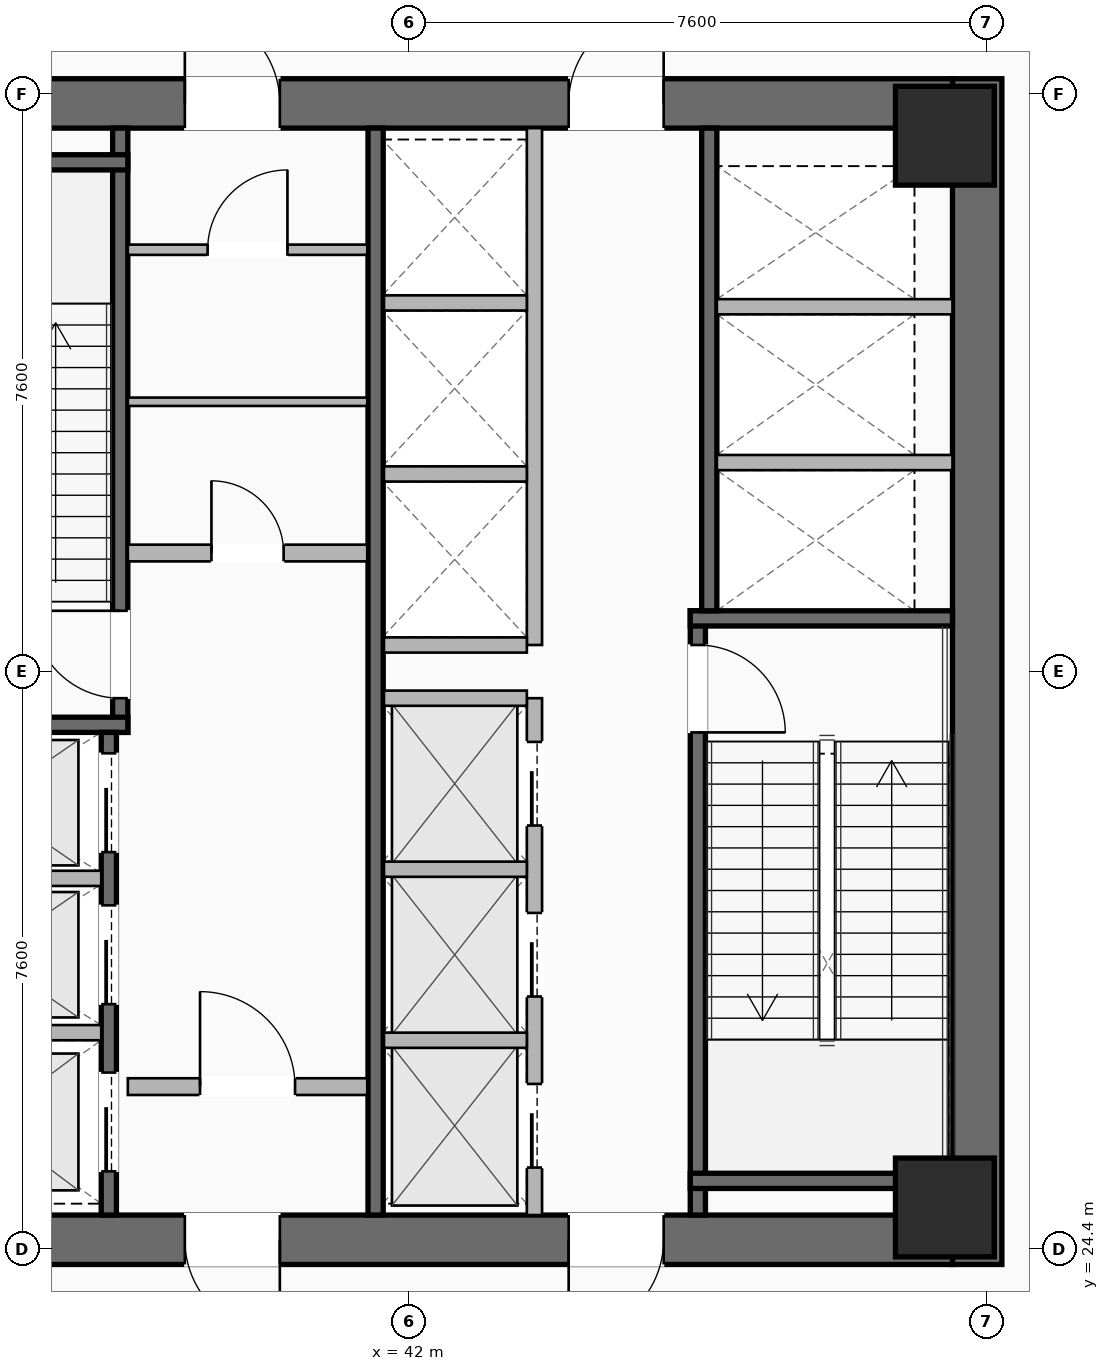
"""IFC4 building model, lengths in metres.
Left out: names, types, materials, properties, quantities, classifications, styles, units other than length and angle.
Written with IfcOpenShell. Run it as: python <this file> out.ifc"""

import sys

from ifc_helpers import new_model, si_unit, direction, frame, frame_2d, origin, origin_2d, place, context, subcontext, project, spatial, rectangle, hollow_rectangle, extrude, element, fill, save


model = new_model("IFC4")
c1 = context("Model", 3, precision=1e-05, world=origin(), true_north=direction((0.0, 1.0)))
c2 = subcontext(c1, "Body", "Model", "MODEL_VIEW")
j1 = project(units=[si_unit("LENGTHUNIT", "METRE"), si_unit("PLANEANGLEUNIT", "RADIAN")], contexts=[c1])
p1 = place(None, origin())
s1 = spatial("IfcSite", under=j1, at=p1, CompositionType="ELEMENT")
p2 = place(p1, origin())
s2 = spatial("IfcBuilding", under=s1, at=p2, CompositionType="ELEMENT")
p3 = place(p2, frame((0.0, 0.0, 10.2)))
s3 = spatial("IfcBuildingStorey", under=s2, at=p3, CompositionType="ELEMENT", Elevation=10.2)
p4 = place(p3, frame((49.475, 39.8, 0.0), z_axis=(0.0, 0.0, 1.0), x_axis=(0.0, -1.0, 0.0)))
e1 = element("IfcWall", 1, at=p4, inside=s3, PredefinedType="SHEAR", context=c2, shape_type="SweptSolid", body=[
    extrude(rectangle(XDim=15.6, YDim=0.65, at=frame_2d((7.8, 0.0))), origin(), (0.0, 0.0, 1.0), 5.4),
])
p5 = place(p3, frame((49.15, 24.525, 0.0), z_axis=(0.0, 0.0, 1.0), x_axis=(-1.0, 0.0, 0.0)))
e2 = element("IfcWall", 2, at=p5, inside=s3, PredefinedType="SHEAR", context=c2, shape_type="SweptSolid", body=[
    extrude(rectangle(XDim=14.3, YDim=0.65, at=frame_2d((7.15, 0.0))), origin(), (0.0, 0.0, 1.0), 5.4),
])
p6 = place(p5, frame((8.85, 0.0, 0.0)))
e3 = element("IfcOpeningElement", 3, at=p6, cuts=e2, PredefinedType="OPENING", context=c2, shape_type="SweptSolid", body=[
    extrude(rectangle(XDim=1.25, YDim=2.25, at=frame_2d((0.625, 1.125))), frame((0.0, 0.335, 0.0), z_axis=(0.0, -1.0, 0.0), x_axis=(1.0, 0.0, 0.0)), (0.0, 0.0, 1.0), 0.67),
])
p7 = place(p5, frame((3.8, 0.0, 0.0)))
e4 = element("IfcOpeningElement", 4, at=p7, cuts=e2, PredefinedType="OPENING", context=c2, shape_type="SweptSolid", body=[
    extrude(rectangle(XDim=1.25, YDim=2.25, at=frame_2d((0.625, 1.125))), frame((0.0, 0.335, 0.0), z_axis=(0.0, -1.0, 0.0), x_axis=(1.0, 0.0, 0.0)), (0.0, 0.0, 1.0), 0.67),
])
p8 = place(p3, frame((34.85, 39.475, 0.0), z_axis=(0.0, 0.0, 1.0), x_axis=(1.0, 0.0, 0.0)))
e5 = element("IfcWall", 5, at=p8, inside=s3, PredefinedType="SHEAR", context=c2, shape_type="SweptSolid", body=[
    extrude(rectangle(XDim=14.3, YDim=0.65, at=frame_2d((7.15, 0.0))), origin(), (0.0, 0.0, 1.0), 5.4),
])
p9 = place(p8, frame((4.2, 0.0, 0.0)))
e6 = element("IfcOpeningElement", 6, at=p9, cuts=e5, PredefinedType="OPENING", context=c2, shape_type="SweptSolid", body=[
    extrude(rectangle(XDim=1.25, YDim=2.25, at=frame_2d((0.625, 1.125))), frame((0.0, 0.335, 0.0), z_axis=(0.0, -1.0, 0.0), x_axis=(1.0, 0.0, 0.0)), (0.0, 0.0, 1.0), 0.67),
])
p10 = place(p8, frame((9.25, 0.0, 0.0)))
e7 = element("IfcOpeningElement", 7, at=p10, cuts=e5, PredefinedType="OPENING", context=c2, shape_type="SweptSolid", body=[
    extrude(rectangle(XDim=1.25, YDim=2.25, at=frame_2d((0.625, 1.125))), frame((0.0, 0.335, 0.0), z_axis=(0.0, -1.0, 0.0), x_axis=(1.0, 0.0, 0.0)), (0.0, 0.0, 1.0), 0.67),
])
for number, where, z_axis, x_axis in (
    (8, (49.05, 24.95, 0.0), (0.0, 0.0, 1.0), (1.0, 0.0, 0.0)),
    (9, (49.05, 39.05, 0.0), (0.0, 0.0, 1.0), (1.0, 0.0, 0.0)),
):
    element("IfcColumn", number, at=place(p3, frame(where, z_axis=z_axis, x_axis=x_axis)), inside=s3, PredefinedType="COLUMN", context=c2, shape_type="SweptSolid", body=[
        extrude(hollow_rectangle(XDim=1.3, YDim=1.3, WallThickness=0.05, at=origin_2d()), origin(), (0.0, 0.0, 1.0), 5.14),
    ])
p11 = place(p3, frame((38.2, 31.2, 0.0), z_axis=(0.0, 0.0, 1.0), x_axis=(0.0, 1.0, 0.0)))
e10 = element("IfcWall", 10, at=p11, inside=s3, PredefinedType="SHEAR", context=c2, shape_type="SweptSolid", body=[
    extrude(rectangle(XDim=7.95, YDim=0.2, at=frame_2d((3.975, 0.0))), origin(), (0.0, 0.0, 1.0), 5.14),
])
p12 = place(p11, frame((0.45, 0.0, 0.0)))
e11 = element("IfcOpeningElement", 11, at=p12, cuts=e10, PredefinedType="OPENING", context=c2, shape_type="SweptSolid", body=[
    extrude(rectangle(XDim=1.15, YDim=2.2, at=frame_2d((0.575, 1.1))), frame((0.0, 0.11, 0.0), z_axis=(0.0, -1.0, 0.0), x_axis=(1.0, 0.0, 0.0)), (0.0, 0.0, 1.0), 0.22),
])
for number, where, z_axis, x_axis in (
    (12, (34.85, 31.3, 0.0), (0.0, 0.0, 1.0), (1.0, 0.0, 0.0)),
    (13, (34.85, 38.7, 0.0), (0.0, 0.0, 1.0), (1.0, 0.0, 0.0)),
):
    element("IfcWall", number, at=place(p3, frame(where, z_axis=z_axis, x_axis=x_axis)), inside=s3, PredefinedType="SHEAR", context=c2, shape_type="SweptSolid", body=[
        extrude(rectangle(XDim=3.45, YDim=0.2, at=frame_2d((1.725, 0.0))), origin(), (0.0, 0.0, 1.0), 5.14),
    ])
p13 = place(p3, frame((45.8, 32.8, 0.0), z_axis=(0.0, 0.0, 1.0), x_axis=(0.0, -1.0, 0.0)))
e14 = element("IfcWall", 14, at=p13, inside=s3, PredefinedType="SHEAR", context=c2, shape_type="SweptSolid", body=[
    extrude(rectangle(XDim=7.95, YDim=0.2, at=frame_2d((3.975, 0.0))), origin(), (0.0, 0.0, 1.0), 5.14),
])
p14 = place(p13, frame((0.45, 0.0, 0.0)))
e15 = element("IfcOpeningElement", 15, at=p14, cuts=e14, PredefinedType="OPENING", context=c2, shape_type="SweptSolid", body=[
    extrude(rectangle(XDim=1.15, YDim=2.2, at=frame_2d((0.575, 1.1))), frame((0.0, 0.11, 0.0), z_axis=(0.0, -1.0, 0.0), x_axis=(1.0, 0.0, 0.0)), (0.0, 0.0, 1.0), 0.22),
])
for number, where, z_axis, x_axis in (
    (16, (45.7, 32.7, 0.0), (0.0, 0.0, 1.0), (1.0, 0.0, 0.0)),
    (17, (45.7, 25.3, 0.0), (0.0, 0.0, 1.0), (1.0, 0.0, 0.0)),
):
    element("IfcWall", number, at=place(p3, frame(where, z_axis=z_axis, x_axis=x_axis)), inside=s3, PredefinedType="SHEAR", context=c2, shape_type="SweptSolid", body=[
        extrude(rectangle(XDim=3.45, YDim=0.2, at=frame_2d((1.725, 0.0))), origin(), (0.0, 0.0, 1.0), 5.14),
    ])
p15 = place(p3, frame((41.56, 24.85, 0.0), z_axis=(0.0, 0.0, 1.0), x_axis=(0.0, 1.0, 0.0)))
e18 = element("IfcWall", 18, at=p15, inside=s3, PredefinedType="SHEAR", context=c2, shape_type="SweptSolid", body=[
    extrude(rectangle(XDim=14.3, YDim=0.2, at=frame_2d((7.15, 0.0))), origin(), (0.0, 0.0, 1.0), 5.14),
])
p16 = place(p3, frame((38.3, 33.56, 0.0), z_axis=(0.0, 0.0, 1.0), x_axis=(1.0, 0.0, 0.0)))
e19 = element("IfcWall", 19, at=p16, inside=s3, PredefinedType="SOLIDWALL", context=c2, shape_type="SweptSolid", body=[
    extrude(rectangle(XDim=3.15, YDim=0.22, at=frame_2d((1.575, 0.0))), origin(), (0.0, 0.0, 1.0), 2.71),
])
p17 = place(p16, frame((1.1, 0.0, 0.0)))
e20 = element("IfcOpeningElement", 20, at=p17, cuts=e19, PredefinedType="OPENING", context=c2, shape_type="SweptSolid", body=[
    extrude(rectangle(XDim=0.95, YDim=2.05, at=frame_2d((0.475, 1.025))), frame((0.0, 0.12, 0.0), z_axis=(0.0, -1.0, 0.0), x_axis=(1.0, 0.0, 0.0)), (0.0, 0.0, 1.0), 0.24),
])
p18 = place(p3, frame((38.3, 26.54, 0.0), z_axis=(0.0, 0.0, 1.0), x_axis=(1.0, 0.0, 0.0)))
e21 = element("IfcWall", 21, at=p18, inside=s3, PredefinedType="SOLIDWALL", context=c2, shape_type="SweptSolid", body=[
    extrude(rectangle(XDim=3.15, YDim=0.22, at=frame_2d((1.575, 0.0))), origin(), (0.0, 0.0, 1.0), 2.71),
])
p19 = place(p18, frame((0.95, 0.0, 0.0)))
e22 = element("IfcOpeningElement", 22, at=p19, cuts=e21, PredefinedType="OPENING", context=c2, shape_type="SweptSolid", body=[
    extrude(rectangle(XDim=1.25, YDim=2.25, at=frame_2d((0.625, 1.125))), frame((0.0, 0.12, 0.0), z_axis=(0.0, -1.0, 0.0), x_axis=(1.0, 0.0, 0.0)), (0.0, 0.0, 1.0), 0.24),
])
p20 = place(p3, frame((38.05, 24.85, 0.0), z_axis=(0.0, 0.0, 1.0), x_axis=(0.0, 1.0, 0.0)))
e23 = element("IfcWall", 23, at=p20, inside=s3, PredefinedType="SHEAR", context=c2, shape_type="SweptSolid", body=[
    extrude(rectangle(XDim=6.35, YDim=0.2, at=frame_2d((3.175, 0.0))), origin(), (0.0, 0.0, 1.0), 5.14),
])
p21 = place(p20, frame((4.775, 0.0, 0.0)))
e24 = element("IfcOpeningElement", 24, at=p21, cuts=e23, PredefinedType="OPENING", context=c2, shape_type="SweptSolid", body=[
    extrude(rectangle(XDim=1.3, YDim=2.25, at=frame_2d((0.65, 1.125))), frame((0.0, 0.11, 0.0), z_axis=(0.0, -1.0, 0.0), x_axis=(1.0, 0.0, 0.0)), (0.0, 0.0, 1.0), 0.22),
])
p22 = place(p20, frame((2.775, 0.0, 0.0)))
e25 = element("IfcOpeningElement", 25, at=p22, cuts=e23, PredefinedType="OPENING", context=c2, shape_type="SweptSolid", body=[
    extrude(rectangle(XDim=1.3, YDim=2.25, at=frame_2d((0.65, 1.125))), frame((0.0, 0.11, 0.0), z_axis=(0.0, -1.0, 0.0), x_axis=(1.0, 0.0, 0.0)), (0.0, 0.0, 1.0), 0.22),
])
p23 = place(p20, frame((0.575, 0.0, 0.0)))
e26 = element("IfcOpeningElement", 26, at=p23, cuts=e23, PredefinedType="OPENING", context=c2, shape_type="SweptSolid", body=[
    extrude(rectangle(XDim=1.3, YDim=2.25, at=frame_2d((0.65, 1.125))), frame((0.0, 0.11, 0.0), z_axis=(0.0, -1.0, 0.0), x_axis=(1.0, 0.0, 0.0)), (0.0, 0.0, 1.0), 0.22),
])
for number, where, z_axis, x_axis in (
    (27, (34.85, 27.25, 0.0), (0.0, 0.0, 1.0), (1.0, 0.0, 0.0)),
    (28, (34.85, 29.28, 0.0), (0.0, 0.0, 1.0), (1.0, 0.0, 0.0)),
):
    element("IfcWall", number, at=place(p3, frame(where, z_axis=z_axis, x_axis=x_axis)), inside=s3, PredefinedType="SOLIDWALL", context=c2, shape_type="SweptSolid", body=[
        extrude(rectangle(XDim=3.1, YDim=0.2, at=frame_2d((1.55, 0.0))), origin(), (0.0, 0.0, 1.0), 5.14),
    ])
p24 = place(p3, frame((45.95, 39.15, 0.0), z_axis=(0.0, 0.0, 1.0), x_axis=(0.0, -1.0, 0.0)))
e29 = element("IfcWall", 29, at=p24, inside=s3, PredefinedType="SHEAR", context=c2, shape_type="SweptSolid", body=[
    extrude(rectangle(XDim=6.35, YDim=0.2, at=frame_2d((3.175, 0.0))), origin(), (0.0, 0.0, 1.0), 5.14),
])
for number, where, z_axis, x_axis in (
    (30, (46.05, 34.75, 0.0), (0.0, 0.0, 1.0), (1.0, 0.0, 0.0)),
    (31, (46.05, 36.8, 0.0), (0.0, 0.0, 1.0), (1.0, 0.0, 0.0)),
):
    element("IfcWall", number, at=place(p3, frame(where, z_axis=z_axis, x_axis=x_axis)), inside=s3, PredefinedType="SOLIDWALL", context=c2, shape_type="SweptSolid", body=[
        extrude(rectangle(XDim=3.1, YDim=0.2, at=frame_2d((1.55, 0.0))), origin(), (0.0, 0.0, 1.0), 5.14),
    ])
p25 = place(p3, frame((38.3, 37.55, 0.0), z_axis=(0.0, 0.0, 1.0), x_axis=(1.0, 0.0, 0.0)))
e32 = element("IfcWall", 32, at=p25, inside=s3, PredefinedType="PARTITIONING", context=c2, shape_type="SweptSolid", body=[
    extrude(rectangle(XDim=3.15, YDim=0.135, at=frame_2d((1.575, 0.0))), origin(), (0.0, 0.0, 1.0), 2.71),
])
p26 = place(p25, frame((1.05, 0.0, 0.0)))
e33 = element("IfcOpeningElement", 33, at=p26, cuts=e32, PredefinedType="OPENING", context=c2, shape_type="SweptSolid", body=[
    extrude(rectangle(XDim=1.05, YDim=2.2, at=frame_2d((0.525, 1.1))), frame((0.0, 0.077, 0.0), z_axis=(0.0, -1.0, 0.0), x_axis=(1.0, 0.0, 0.0)), (0.0, 0.0, 1.0), 0.155),
])
p27 = place(p3, frame((38.3, 35.55, 0.0), z_axis=(0.0, 0.0, 1.0), x_axis=(1.0, 0.0, 0.0)))
e34 = element("IfcWall", 34, at=p27, inside=s3, PredefinedType="PARTITIONING", context=c2, shape_type="SweptSolid", body=[
    extrude(rectangle(XDim=3.15, YDim=0.11, at=frame_2d((1.575, 0.0))), origin(), (0.0, 0.0, 1.0), 2.71),
])
p28 = place(p3, frame((43.65, 24.85, 0.0), z_axis=(0.0, 0.0, 1.0), x_axis=(0.0, 1.0, 0.0)))
e35 = element("IfcWall", 35, at=p28, inside=s3, PredefinedType="SOLIDWALL", context=c2, shape_type="SweptSolid", body=[
    extrude(rectangle(XDim=6.8, YDim=0.2, at=frame_2d((3.4, 0.0))), origin(), (0.0, 0.0, 1.0), 5.14),
])
p29 = place(p28, frame((0.625, 0.0, 0.0)))
e36 = element("IfcOpeningElement", 36, at=p29, cuts=e35, PredefinedType="OPENING", context=c2, shape_type="SweptSolid", body=[
    extrude(rectangle(XDim=1.1, YDim=2.2, at=frame_2d((0.55, 1.1))), frame((0.0, 0.11, 0.0), z_axis=(0.0, -1.0, 0.0), x_axis=(1.0, 0.0, 0.0)), (0.0, 0.0, 1.0), 0.22),
])
p30 = place(p28, frame((2.875, 0.0, 0.0)))
e37 = element("IfcOpeningElement", 37, at=p30, cuts=e35, PredefinedType="OPENING", context=c2, shape_type="SweptSolid", body=[
    extrude(rectangle(XDim=1.1, YDim=2.2, at=frame_2d((0.55, 1.1))), frame((0.0, 0.11, 0.0), z_axis=(0.0, -1.0, 0.0), x_axis=(1.0, 0.0, 0.0)), (0.0, 0.0, 1.0), 0.22),
])
p31 = place(p28, frame((5.125, 0.0, 0.0)))
e38 = element("IfcOpeningElement", 38, at=p31, cuts=e35, PredefinedType="OPENING", context=c2, shape_type="SweptSolid", body=[
    extrude(rectangle(XDim=1.1, YDim=2.2, at=frame_2d((0.55, 1.1))), frame((0.0, 0.11, 0.0), z_axis=(0.0, -1.0, 0.0), x_axis=(1.0, 0.0, 0.0)), (0.0, 0.0, 1.0), 0.22),
])
for number, where, z_axis, x_axis in (
    (39, (41.67, 27.15, 0.0), (0.0, 0.0, 1.0), (1.0, 0.0, 0.0)),
    (40, (41.67, 29.4, 0.0), (0.0, 0.0, 1.0), (1.0, 0.0, 0.0)),
    (41, (41.67, 31.65, 0.0), (0.0, 0.0, 1.0), (1.0, 0.0, 0.0)),
):
    element("IfcWall", number, at=place(p3, frame(where, z_axis=z_axis, x_axis=x_axis)), inside=s3, PredefinedType="SOLIDWALL", context=c2, shape_type="SweptSolid", body=[
        extrude(rectangle(XDim=1.88, YDim=0.2, at=frame_2d((0.94, 0.0))), origin(), (0.0, 0.0, 1.0), 5.14),
    ])
p32 = place(p3, frame((43.65, 32.35, 0.0), z_axis=(0.0, 0.0, 1.0), x_axis=(0.0, 1.0, 0.0)))
e42 = element("IfcWall", 42, at=p32, inside=s3, PredefinedType="SOLIDWALL", context=c2, shape_type="SweptSolid", body=[
    extrude(rectangle(XDim=6.8, YDim=0.2, at=frame_2d((3.4, 0.0))), origin(), (0.0, 0.0, 1.0), 5.14),
])
for number, where, z_axis, x_axis in (
    (43, (41.67, 32.35, 0.0), (0.0, 0.0, 1.0), (1.0, 0.0, 0.0)),
    (44, (41.67, 34.6, 0.0), (0.0, 0.0, 1.0), (1.0, 0.0, 0.0)),
    (45, (41.67, 36.85, 0.0), (0.0, 0.0, 1.0), (1.0, 0.0, 0.0)),
):
    element("IfcWall", number, at=place(p3, frame(where, z_axis=z_axis, x_axis=x_axis)), inside=s3, PredefinedType="SOLIDWALL", context=c2, shape_type="SweptSolid", body=[
        extrude(rectangle(XDim=1.88, YDim=0.2, at=frame_2d((0.94, 0.0))), origin(), (0.0, 0.0, 1.0), 5.14),
    ])
p33 = place(p9, origin())
e46 = element("IfcDoor", 46, at=p33, inside=s3, OperationType="SINGLE_SWING_LEFT", PredefinedType="DOOR", context=c2, shape_type="SweptSolid", body=[
    extrude(rectangle(XDim=1.25, YDim=2.25, at=frame_2d((0.625, 1.125))), frame((0.0, 0.025, 0.0), z_axis=(0.0, -1.0, 0.0), x_axis=(1.0, 0.0, 0.0)), (0.0, 0.0, 1.0), 0.05),
])
fill(e6, e46)
p34 = place(p10, origin())
e47 = element("IfcDoor", 47, at=p34, inside=s3, OperationType="SINGLE_SWING_RIGHT", PredefinedType="DOOR", context=c2, shape_type="SweptSolid", body=[
    extrude(rectangle(XDim=1.25, YDim=2.25, at=frame_2d((0.625, 1.125))), frame((0.0, 0.025, 0.0), z_axis=(0.0, -1.0, 0.0), x_axis=(1.0, 0.0, 0.0)), (0.0, 0.0, 1.0), 0.05),
])
fill(e7, e47)
p35 = place(p6, origin())
e48 = element("IfcDoor", 48, at=p35, inside=s3, OperationType="SINGLE_SWING_LEFT", PredefinedType="DOOR", context=c2, shape_type="SweptSolid", body=[
    extrude(rectangle(XDim=1.25, YDim=2.25, at=frame_2d((0.625, 1.125))), frame((0.0, 0.025, 0.0), z_axis=(0.0, -1.0, 0.0), x_axis=(1.0, 0.0, 0.0)), (0.0, 0.0, 1.0), 0.05),
])
fill(e3, e48)
p36 = place(p7, origin())
e49 = element("IfcDoor", 49, at=p36, inside=s3, OperationType="SINGLE_SWING_RIGHT", PredefinedType="DOOR", context=c2, shape_type="SweptSolid", body=[
    extrude(rectangle(XDim=1.25, YDim=2.25, at=frame_2d((0.625, 1.125))), frame((0.0, 0.025, 0.0), z_axis=(0.0, -1.0, 0.0), x_axis=(1.0, 0.0, 0.0)), (0.0, 0.0, 1.0), 0.05),
])
fill(e4, e49)
p37 = place(p12, origin())
e50 = element("IfcDoor", 50, at=p37, inside=s3, OperationType="SINGLE_SWING_RIGHT", PredefinedType="DOOR", context=c2, shape_type="SweptSolid", body=[
    extrude(rectangle(XDim=1.15, YDim=2.2, at=frame_2d((0.575, 1.1))), frame((0.0, 0.025, 0.0), z_axis=(0.0, -1.0, 0.0), x_axis=(1.0, 0.0, 0.0)), (0.0, 0.0, 1.0), 0.05),
])
fill(e11, e50)
p38 = place(p14, origin())
e51 = element("IfcDoor", 51, at=p38, inside=s3, OperationType="SINGLE_SWING_RIGHT", PredefinedType="DOOR", context=c2, shape_type="SweptSolid", body=[
    extrude(rectangle(XDim=1.15, YDim=2.2, at=frame_2d((0.575, 1.1))), frame((0.0, 0.025, 0.0), z_axis=(0.0, -1.0, 0.0), x_axis=(1.0, 0.0, 0.0)), (0.0, 0.0, 1.0), 0.05),
])
fill(e15, e51)
p39 = place(p19, origin())
e52 = element("IfcDoor", 52, at=p39, inside=s3, OperationType="SINGLE_SWING_LEFT", PredefinedType="DOOR", context=c2, shape_type="SweptSolid", body=[
    extrude(rectangle(XDim=1.25, YDim=2.25, at=frame_2d((0.625, 1.125))), frame((0.0, 0.025, 0.0), z_axis=(0.0, -1.0, 0.0), x_axis=(1.0, 0.0, 0.0)), (0.0, 0.0, 1.0), 0.05),
])
fill(e22, e52)
p40 = place(p26, origin())
e53 = element("IfcDoor", 53, at=p40, inside=s3, OperationType="SINGLE_SWING_RIGHT", PredefinedType="DOOR", context=c2, shape_type="SweptSolid", body=[
    extrude(rectangle(XDim=1.05, YDim=2.2, at=frame_2d((0.525, 1.1))), frame((0.0, 0.025, 0.0), z_axis=(0.0, -1.0, 0.0), x_axis=(1.0, 0.0, 0.0)), (0.0, 0.0, 1.0), 0.05),
])
fill(e33, e53)
p41 = place(p17, origin())
e54 = element("IfcDoor", 54, at=p41, inside=s3, OperationType="SINGLE_SWING_LEFT", PredefinedType="DOOR", context=c2, shape_type="SweptSolid", body=[
    extrude(rectangle(XDim=0.95, YDim=2.05, at=frame_2d((0.475, 1.025))), frame((0.0, 0.025, 0.0), z_axis=(0.0, -1.0, 0.0), x_axis=(1.0, 0.0, 0.0)), (0.0, 0.0, 1.0), 0.05),
])
fill(e20, e54)
p42 = place(p21, origin())
e55 = element("IfcDoor", 55, at=p42, inside=s3, OperationType="SLIDING_TO_LEFT", PredefinedType="DOOR", context=c2, shape_type="SweptSolid", body=[
    extrude(rectangle(XDim=1.3, YDim=2.25, at=frame_2d((0.65, 1.125))), frame((0.0, 0.025, 0.0), z_axis=(0.0, -1.0, 0.0), x_axis=(1.0, 0.0, 0.0)), (0.0, 0.0, 1.0), 0.05),
])
fill(e24, e55)
p43 = place(p22, origin())
e56 = element("IfcDoor", 56, at=p43, inside=s3, OperationType="SLIDING_TO_LEFT", PredefinedType="DOOR", context=c2, shape_type="SweptSolid", body=[
    extrude(rectangle(XDim=1.3, YDim=2.25, at=frame_2d((0.65, 1.125))), frame((0.0, 0.025, 0.0), z_axis=(0.0, -1.0, 0.0), x_axis=(1.0, 0.0, 0.0)), (0.0, 0.0, 1.0), 0.05),
])
fill(e25, e56)
p44 = place(p23, origin())
e57 = element("IfcDoor", 57, at=p44, inside=s3, OperationType="SLIDING_TO_LEFT", PredefinedType="DOOR", context=c2, shape_type="SweptSolid", body=[
    extrude(rectangle(XDim=1.3, YDim=2.25, at=frame_2d((0.65, 1.125))), frame((0.0, 0.025, 0.0), z_axis=(0.0, -1.0, 0.0), x_axis=(1.0, 0.0, 0.0)), (0.0, 0.0, 1.0), 0.05),
])
fill(e26, e57)
p45 = place(p29, origin())
e58 = element("IfcDoor", 58, at=p45, inside=s3, OperationType="SLIDING_TO_LEFT", PredefinedType="DOOR", context=c2, shape_type="SweptSolid", body=[
    extrude(rectangle(XDim=1.1, YDim=2.2, at=frame_2d((0.55, 1.1))), frame((0.0, 0.025, 0.0), z_axis=(0.0, -1.0, 0.0), x_axis=(1.0, 0.0, 0.0)), (0.0, 0.0, 1.0), 0.05),
])
fill(e36, e58)
p46 = place(p30, origin())
e59 = element("IfcDoor", 59, at=p46, inside=s3, OperationType="SLIDING_TO_LEFT", PredefinedType="DOOR", context=c2, shape_type="SweptSolid", body=[
    extrude(rectangle(XDim=1.1, YDim=2.2, at=frame_2d((0.55, 1.1))), frame((0.0, 0.025, 0.0), z_axis=(0.0, -1.0, 0.0), x_axis=(1.0, 0.0, 0.0)), (0.0, 0.0, 1.0), 0.05),
])
fill(e37, e59)
p47 = place(p31, origin())
e60 = element("IfcDoor", 60, at=p47, inside=s3, OperationType="SLIDING_TO_LEFT", PredefinedType="DOOR", context=c2, shape_type="SweptSolid", body=[
    extrude(rectangle(XDim=1.1, YDim=2.2, at=frame_2d((0.55, 1.1))), frame((0.0, 0.025, 0.0), z_axis=(0.0, -1.0, 0.0), x_axis=(1.0, 0.0, 0.0)), (0.0, 0.0, 1.0), 0.05),
])
fill(e38, e60)
save(model, sys.argv[1])
